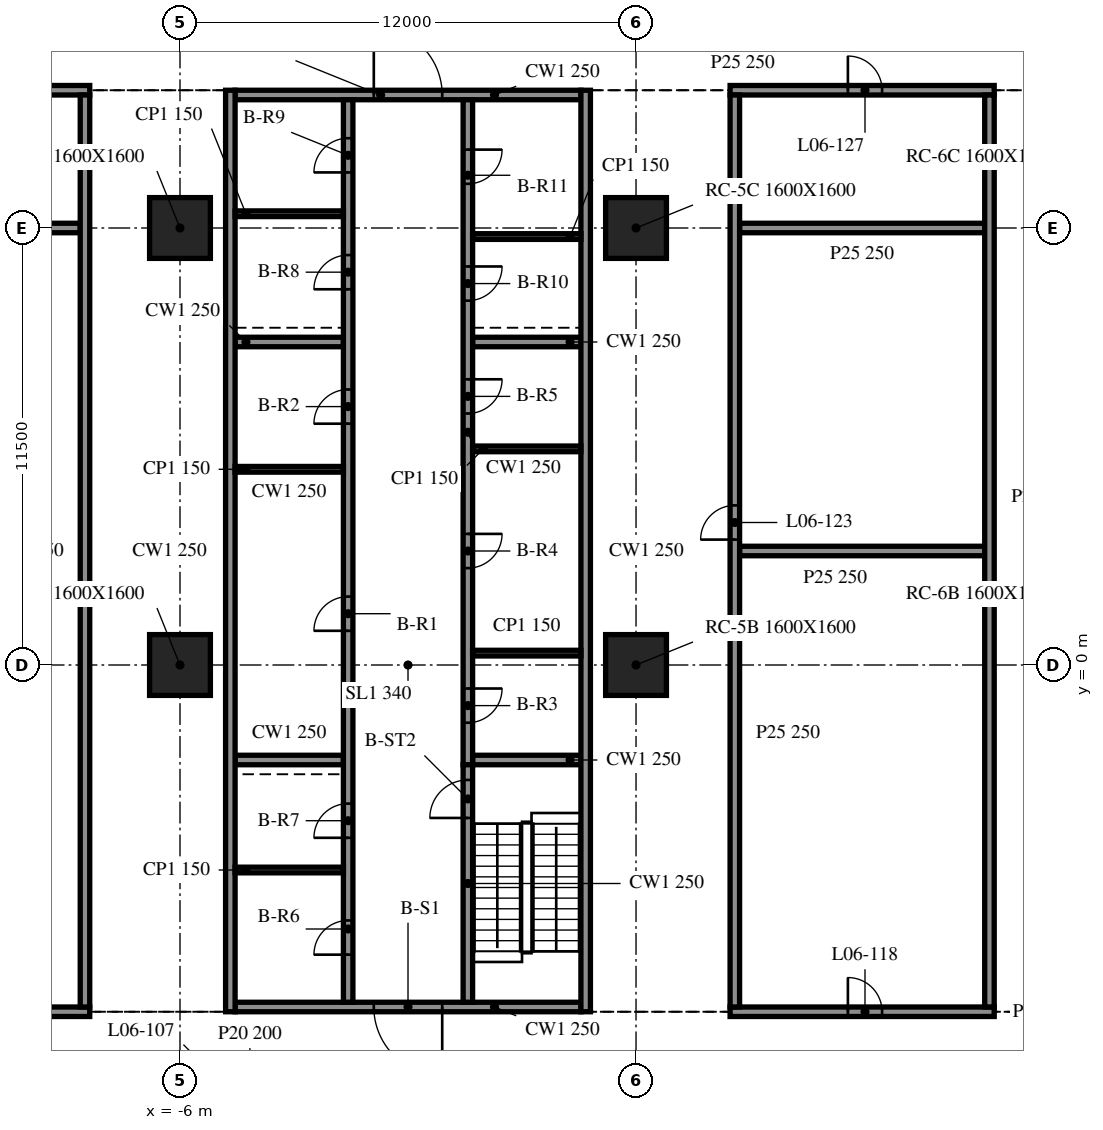
"""IFC4 building model, lengths in metres.
Left out: names, types, materials, properties, quantities, classifications, styles, units other than length and angle.
Written with IfcOpenShell. Run it as: python <this file> out.ifc"""

import sys

from ifc_helpers import new_model, si_unit, direction, frame, frame_2d, origin, origin_2d, place, context, subcontext, project, spatial, rectangle, extrude, element, fill, save


model = new_model("IFC4")
c1 = context("Model", 3, precision=1e-05, world=origin(), true_north=direction((0.0, 1.0)))
c2 = subcontext(c1, "Body", "Model", "MODEL_VIEW")
j1 = project(units=[si_unit("LENGTHUNIT", "METRE"), si_unit("PLANEANGLEUNIT", "RADIAN")], contexts=[c1])
p1 = place(None, origin())
s1 = spatial("IfcSite", under=j1, at=p1, CompositionType="ELEMENT")
p2 = place(p1, origin())
s2 = spatial("IfcBuilding", under=s1, at=p2, CompositionType="ELEMENT")
p3 = place(p2, frame((0.0, 0.0, 28.7)))
s3 = spatial("IfcBuildingStorey", under=s2, at=p3, CompositionType="ELEMENT", Elevation=28.7)
for number, where, z_axis, x_axis in (
    (1, (-6.0, 0.0, -0.34), (0.0, 0.0, 1.0), (1.0, 0.0, 0.0)),
    (2, (-6.0, 11.5, -0.34), (0.0, 0.0, 1.0), (1.0, 0.0, 0.0)),
    (3, (6.0, 0.0, -0.34), (0.0, 0.0, 1.0), (1.0, 0.0, 0.0)),
    (4, (6.0, 11.5, -0.34), (0.0, 0.0, 1.0), (1.0, 0.0, 0.0)),
):
    element("IfcColumn", number, at=place(p3, frame(where, z_axis=z_axis, x_axis=x_axis)), inside=s3, PredefinedType="COLUMN", context=c2, shape_type="SweptSolid", body=[
        extrude(rectangle(XDim=1.6, YDim=1.6, at=origin_2d()), origin(), (0.0, 0.0, 1.0), 4.3),
    ])
for number, where, z_axis, x_axis in (
    (5, (-4.675, 15.125, 0.0), (0.0, 0.0, 1.0), (0.0, -1.0, 0.0)),
    (6, (4.675, -9.125, 0.0), (0.0, 0.0, 1.0), (0.0, 1.0, 0.0)),
):
    element("IfcWall", number, at=place(p3, frame(where, z_axis=z_axis, x_axis=x_axis)), inside=s3, PredefinedType="SOLIDWALL", context=c2, shape_type="SweptSolid", body=[
        extrude(rectangle(XDim=24.25, YDim=0.25, at=frame_2d((12.125, 0.0))), origin(), (0.0, 0.0, 1.0), 3.96),
    ])
p4 = place(p3, frame((4.55, -9.0, 0.0), z_axis=(0.0, 0.0, 1.0), x_axis=(-1.0, 0.0, 0.0)))
e7 = element("IfcWall", 7, at=p4, inside=s3, PredefinedType="SOLIDWALL", context=c2, shape_type="SweptSolid", body=[
    extrude(rectangle(XDim=9.1, YDim=0.25, at=frame_2d((4.55, 0.0))), origin(), (0.0, 0.0, 1.0), 3.96),
])
p5 = place(p4, frame((3.65, 0.0, 0.0)))
e8 = element("IfcOpeningElement", 8, at=p5, cuts=e7, PredefinedType="OPENING", context=c2, shape_type="SweptSolid", body=[
    extrude(rectangle(XDim=1.8, YDim=2.1, at=frame_2d((0.9, 1.05))), frame((0.0, 0.135, 0.0), z_axis=(0.0, -1.0, 0.0), x_axis=(1.0, 0.0, 0.0)), (0.0, 0.0, 1.0), 0.27),
])
p6 = place(p3, frame((-4.55, 15.0, 0.0), z_axis=(0.0, 0.0, 1.0), x_axis=(1.0, 0.0, 0.0)))
e9 = element("IfcWall", 9, at=p6, inside=s3, PredefinedType="SOLIDWALL", context=c2, shape_type="SweptSolid", body=[
    extrude(rectangle(XDim=9.1, YDim=0.25, at=frame_2d((4.55, 0.0))), origin(), (0.0, 0.0, 1.0), 3.96),
])
p7 = place(p6, frame((3.65, 0.0, 0.0)))
e10 = element("IfcOpeningElement", 10, at=p7, cuts=e9, PredefinedType="OPENING", context=c2, shape_type="SweptSolid", body=[
    extrude(rectangle(XDim=1.8, YDim=2.1, at=frame_2d((0.9, 1.05))), frame((0.0, 0.135, 0.0), z_axis=(0.0, -1.0, 0.0), x_axis=(1.0, 0.0, 0.0)), (0.0, 0.0, 1.0), 0.27),
])
p8 = place(p3, frame((-1.575, -8.875, 0.0), z_axis=(0.0, 0.0, 1.0), x_axis=(0.0, 1.0, 0.0)))
e11 = element("IfcWall", 11, at=p8, inside=s3, PredefinedType="SOLIDWALL", context=c2, shape_type="SweptSolid", body=[
    extrude(rectangle(XDim=23.75, YDim=0.25, at=frame_2d((11.875, 0.0))), origin(), (0.0, 0.0, 1.0), 3.96),
])
p9 = place(p8, frame((9.775, 0.0, 0.0)))
e12 = element("IfcOpeningElement", 12, at=p9, cuts=e11, PredefinedType="OPENING", context=c2, shape_type="SweptSolid", body=[
    extrude(rectangle(XDim=0.9, YDim=2.1, at=frame_2d((0.45, 1.05))), frame((0.0, 0.135, 0.0), z_axis=(0.0, -1.0, 0.0), x_axis=(1.0, 0.0, 0.0)), (0.0, 0.0, 1.0), 0.27),
])
p10 = place(p8, frame((15.225, 0.0, 0.0)))
e13 = element("IfcOpeningElement", 13, at=p10, cuts=e11, PredefinedType="OPENING", context=c2, shape_type="SweptSolid", body=[
    extrude(rectangle(XDim=0.9, YDim=2.1, at=frame_2d((0.45, 1.05))), frame((0.0, 0.135, 0.0), z_axis=(0.0, -1.0, 0.0), x_axis=(1.0, 0.0, 0.0)), (0.0, 0.0, 1.0), 0.27),
])
p11 = place(p8, frame((1.252, 0.0, 0.0)))
e14 = element("IfcOpeningElement", 14, at=p11, cuts=e11, PredefinedType="OPENING", context=c2, shape_type="SweptSolid", body=[
    extrude(rectangle(XDim=0.9, YDim=2.1, at=frame_2d((0.45, 1.05))), frame((0.0, 0.135, 0.0), z_axis=(0.0, -1.0, 0.0), x_axis=(1.0, 0.0, 0.0)), (0.0, 0.0, 1.0), 0.27),
])
p12 = place(p8, frame((4.327, 0.0, 0.0)))
e15 = element("IfcOpeningElement", 15, at=p12, cuts=e11, PredefinedType="OPENING", context=c2, shape_type="SweptSolid", body=[
    extrude(rectangle(XDim=0.9, YDim=2.1, at=frame_2d((0.45, 1.05))), frame((0.0, 0.135, 0.0), z_axis=(0.0, -1.0, 0.0), x_axis=(1.0, 0.0, 0.0)), (0.0, 0.0, 1.0), 0.27),
])
p13 = place(p8, frame((18.762, 0.0, 0.0)))
e16 = element("IfcOpeningElement", 16, at=p13, cuts=e11, PredefinedType="OPENING", context=c2, shape_type="SweptSolid", body=[
    extrude(rectangle(XDim=0.9, YDim=2.1, at=frame_2d((0.45, 1.05))), frame((0.0, 0.135, 0.0), z_axis=(0.0, -1.0, 0.0), x_axis=(1.0, 0.0, 0.0)), (0.0, 0.0, 1.0), 0.27),
])
p14 = place(p8, frame((21.837, 0.0, 0.0)))
e17 = element("IfcOpeningElement", 17, at=p14, cuts=e11, PredefinedType="OPENING", context=c2, shape_type="SweptSolid", body=[
    extrude(rectangle(XDim=0.9, YDim=2.1, at=frame_2d((0.45, 1.05))), frame((0.0, 0.135, 0.0), z_axis=(0.0, -1.0, 0.0), x_axis=(1.0, 0.0, 0.0)), (0.0, 0.0, 1.0), 0.27),
])
p15 = place(p3, frame((1.575, -8.875, 0.0), z_axis=(0.0, 0.0, 1.0), x_axis=(0.0, 1.0, 0.0)))
e18 = element("IfcWall", 18, at=p15, inside=s3, PredefinedType="SOLIDWALL", context=c2, shape_type="SweptSolid", body=[
    extrude(rectangle(XDim=6.25, YDim=0.25, at=frame_2d((3.125, 0.0))), origin(), (0.0, 0.0, 1.0), 3.96),
])
p16 = place(p15, frame((4.85, 0.0, 0.0)))
e19 = element("IfcOpeningElement", 19, at=p16, cuts=e18, PredefinedType="OPENING", context=c2, shape_type="SweptSolid", body=[
    extrude(rectangle(XDim=1.0, YDim=2.1, at=frame_2d((0.5, 1.05))), frame((0.0, 0.135, 0.0), z_axis=(0.0, -1.0, 0.0), x_axis=(1.0, 0.0, 0.0)), (0.0, 0.0, 1.0), 0.27),
])
p17 = place(p3, frame((1.575, 14.875, 0.0), z_axis=(0.0, 0.0, 1.0), x_axis=(0.0, -1.0, 0.0)))
e20 = element("IfcWall", 20, at=p17, inside=s3, PredefinedType="SOLIDWALL", context=c2, shape_type="SweptSolid", body=[
    extrude(rectangle(XDim=17.5, YDim=0.25, at=frame_2d((8.75, 0.0))), origin(), (0.0, 0.0, 1.0), 3.96),
])
p18 = place(p17, frame((15.494, 0.0, 0.0)))
e21 = element("IfcOpeningElement", 21, at=p18, cuts=e20, PredefinedType="OPENING", context=c2, shape_type="SweptSolid", body=[
    extrude(rectangle(XDim=0.9, YDim=2.1, at=frame_2d((0.45, 1.05))), frame((0.0, 0.135, 0.0), z_axis=(0.0, -1.0, 0.0), x_axis=(1.0, 0.0, 0.0)), (0.0, 0.0, 1.0), 0.27),
])
p19 = place(p17, frame((11.425, 0.0, 0.0)))
e22 = element("IfcOpeningElement", 22, at=p19, cuts=e20, PredefinedType="OPENING", context=c2, shape_type="SweptSolid", body=[
    extrude(rectangle(XDim=0.9, YDim=2.1, at=frame_2d((0.45, 1.05))), frame((0.0, 0.135, 0.0), z_axis=(0.0, -1.0, 0.0), x_axis=(1.0, 0.0, 0.0)), (0.0, 0.0, 1.0), 0.27),
])
p20 = place(p17, frame((7.356, 0.0, 0.0)))
e23 = element("IfcOpeningElement", 23, at=p20, cuts=e20, PredefinedType="OPENING", context=c2, shape_type="SweptSolid", body=[
    extrude(rectangle(XDim=0.9, YDim=2.1, at=frame_2d((0.45, 1.05))), frame((0.0, 0.135, 0.0), z_axis=(0.0, -1.0, 0.0), x_axis=(1.0, 0.0, 0.0)), (0.0, 0.0, 1.0), 0.27),
])
p21 = place(p17, frame((4.387, 0.0, 0.0)))
e24 = element("IfcOpeningElement", 24, at=p21, cuts=e20, PredefinedType="OPENING", context=c2, shape_type="SweptSolid", body=[
    extrude(rectangle(XDim=0.9, YDim=2.1, at=frame_2d((0.45, 1.05))), frame((0.0, 0.135, 0.0), z_axis=(0.0, -1.0, 0.0), x_axis=(1.0, 0.0, 0.0)), (0.0, 0.0, 1.0), 0.27),
])
p22 = place(p17, frame((1.312, 0.0, 0.0)))
e25 = element("IfcOpeningElement", 25, at=p22, cuts=e20, PredefinedType="OPENING", context=c2, shape_type="SweptSolid", body=[
    extrude(rectangle(XDim=0.9, YDim=2.1, at=frame_2d((0.45, 1.05))), frame((0.0, 0.135, 0.0), z_axis=(0.0, -1.0, 0.0), x_axis=(1.0, 0.0, 0.0)), (0.0, 0.0, 1.0), 0.27),
])
for number, where, z_axis, x_axis in (
    (26, (-4.55, -2.5, 0.0), (0.0, 0.0, 1.0), (1.0, 0.0, 0.0)),
    (27, (-4.55, 8.5, 0.0), (0.0, 0.0, 1.0), (1.0, 0.0, 0.0)),
    (28, (1.7, -2.5, 0.0), (0.0, 0.0, 1.0), (1.0, 0.0, 0.0)),
    (29, (1.7, 8.5, 0.0), (0.0, 0.0, 1.0), (1.0, 0.0, 0.0)),
):
    element("IfcWall", number, at=place(p3, frame(where, z_axis=z_axis, x_axis=x_axis)), inside=s3, PredefinedType="SOLIDWALL", context=c2, shape_type="SweptSolid", body=[
        extrude(rectangle(XDim=2.85, YDim=0.25, at=frame_2d((1.425, 0.0))), origin(), (0.0, 0.0, 1.0), 3.96),
    ])
for number, where, z_axis, x_axis in (
    (30, (-4.55, 5.15, 0.0), (0.0, 0.0, 1.0), (1.0, 0.0, 0.0)),
    (31, (1.7, 0.312, 0.0), (0.0, 0.0, 1.0), (1.0, 0.0, 0.0)),
    (32, (1.7, 5.688, 0.0), (0.0, 0.0, 1.0), (1.0, 0.0, 0.0)),
    (33, (-4.55, -5.395, 0.0), (0.0, 0.0, 1.0), (1.0, 0.0, 0.0)),
    (34, (-4.55, 11.875, 0.0), (0.0, 0.0, 1.0), (1.0, 0.0, 0.0)),
    (35, (1.7, 11.275, 0.0), (0.0, 0.0, 1.0), (1.0, 0.0, 0.0)),
):
    element("IfcWall", number, at=place(p3, frame(where, z_axis=z_axis, x_axis=x_axis)), inside=s3, PredefinedType="PARTITIONING", context=c2, shape_type="SweptSolid", body=[
        extrude(rectangle(XDim=2.85, YDim=0.15, at=frame_2d((1.425, 0.0))), origin(), (0.0, 0.0, 1.0), 3.96),
    ])
p23 = place(p3, frame((-15.725, -9.125, 0.0), z_axis=(0.0, 0.0, 1.0), x_axis=(1.0, 0.0, 0.0)))
e36 = element("IfcWall", 36, at=p23, inside=s3, PredefinedType="PARTITIONING", context=c2, shape_type="SweptSolid", body=[
    extrude(rectangle(XDim=7.35, YDim=0.25, at=frame_2d((3.675, 0.0))), origin(), (0.0, 0.0, 1.0), 3.96),
])
p24 = place(p3, frame((8.475, -9.125, 0.0), z_axis=(0.0, 0.0, 1.0), x_axis=(1.0, 0.0, 0.0)))
e37 = element("IfcWall", 37, at=p24, inside=s3, PredefinedType="PARTITIONING", context=c2, shape_type="SweptSolid", body=[
    extrude(rectangle(XDim=6.95, YDim=0.25, at=frame_2d((3.475, 0.0))), origin(), (0.0, 0.0, 1.0), 3.96),
])
p25 = place(p24, frame((3.1, 0.0, 0.0)))
e38 = element("IfcOpeningElement", 38, at=p25, cuts=e37, PredefinedType="OPENING", context=c2, shape_type="SweptSolid", body=[
    extrude(rectangle(XDim=0.9, YDim=2.1, at=frame_2d((0.45, 1.05))), frame((0.0, 0.135, 0.0), z_axis=(0.0, -1.0, 0.0), x_axis=(1.0, 0.0, 0.0)), (0.0, 0.0, 1.0), 0.27),
])
p26 = place(p3, frame((8.725, 3.0, 0.0), z_axis=(0.0, 0.0, 1.0), x_axis=(1.0, 0.0, 0.0)))
e39 = element("IfcWall", 39, at=p26, inside=s3, PredefinedType="PARTITIONING", context=c2, shape_type="SweptSolid", body=[
    extrude(rectangle(XDim=6.45, YDim=0.25, at=frame_2d((3.225, 0.0))), origin(), (0.0, 0.0, 1.0), 3.96),
])
p27 = place(p3, frame((-15.475, 11.5, 0.0), z_axis=(0.0, 0.0, 1.0), x_axis=(1.0, 0.0, 0.0)))
e40 = element("IfcWall", 40, at=p27, inside=s3, PredefinedType="PARTITIONING", context=c2, shape_type="SweptSolid", body=[
    extrude(rectangle(XDim=6.85, YDim=0.25, at=frame_2d((3.425, 0.0))), origin(), (0.0, 0.0, 1.0), 3.96),
])
p28 = place(p3, frame((8.725, 11.5, 0.0), z_axis=(0.0, 0.0, 1.0), x_axis=(1.0, 0.0, 0.0)))
e41 = element("IfcWall", 41, at=p28, inside=s3, PredefinedType="PARTITIONING", context=c2, shape_type="SweptSolid", body=[
    extrude(rectangle(XDim=6.45, YDim=0.25, at=frame_2d((3.225, 0.0))), origin(), (0.0, 0.0, 1.0), 3.96),
])
p29 = place(p3, frame((-15.725, 15.125, 0.0), z_axis=(0.0, 0.0, 1.0), x_axis=(1.0, 0.0, 0.0)))
e42 = element("IfcWall", 42, at=p29, inside=s3, PredefinedType="PARTITIONING", context=c2, shape_type="SweptSolid", body=[
    extrude(rectangle(XDim=7.35, YDim=0.25, at=frame_2d((3.675, 0.0))), origin(), (0.0, 0.0, 1.0), 3.96),
])
p30 = place(p29, frame((3.3, 0.0, 0.0)))
e43 = element("IfcOpeningElement", 43, at=p30, cuts=e42, PredefinedType="OPENING", context=c2, shape_type="SweptSolid", body=[
    extrude(rectangle(XDim=0.9, YDim=2.1, at=frame_2d((0.45, 1.05))), frame((0.0, 0.135, 0.0), z_axis=(0.0, -1.0, 0.0), x_axis=(1.0, 0.0, 0.0)), (0.0, 0.0, 1.0), 0.27),
])
p31 = place(p3, frame((8.475, 15.125, 0.0), z_axis=(0.0, 0.0, 1.0), x_axis=(1.0, 0.0, 0.0)))
e44 = element("IfcWall", 44, at=p31, inside=s3, PredefinedType="PARTITIONING", context=c2, shape_type="SweptSolid", body=[
    extrude(rectangle(XDim=6.95, YDim=0.25, at=frame_2d((3.475, 0.0))), origin(), (0.0, 0.0, 1.0), 3.96),
])
p32 = place(p31, frame((3.1, 0.0, 0.0)))
e45 = element("IfcOpeningElement", 45, at=p32, cuts=e44, PredefinedType="OPENING", context=c2, shape_type="SweptSolid", body=[
    extrude(rectangle(XDim=0.9, YDim=2.1, at=frame_2d((0.45, 1.05))), frame((0.0, 0.135, 0.0), z_axis=(0.0, -1.0, 0.0), x_axis=(1.0, 0.0, 0.0)), (0.0, 0.0, 1.0), 0.27),
])
p33 = place(p3, frame((-8.5, -9.0, 0.0), z_axis=(0.0, 0.0, 1.0), x_axis=(0.0, 1.0, 0.0)))
e46 = element("IfcWall", 46, at=p33, inside=s3, PredefinedType="PARTITIONING", context=c2, shape_type="SweptSolid", body=[
    extrude(rectangle(XDim=24.0, YDim=0.25, at=frame_2d((12.0, 0.0))), origin(), (0.0, 0.0, 1.0), 3.96),
])
p34 = place(p3, frame((8.6, -9.0, 0.0), z_axis=(0.0, 0.0, 1.0), x_axis=(0.0, 1.0, 0.0)))
e47 = element("IfcWall", 47, at=p34, inside=s3, PredefinedType="PARTITIONING", context=c2, shape_type="SweptSolid", body=[
    extrude(rectangle(XDim=24.0, YDim=0.25, at=frame_2d((12.0, 0.0))), origin(), (0.0, 0.0, 1.0), 3.96),
])
p35 = place(p34, frame((12.3, 0.0, 0.0)))
e48 = element("IfcOpeningElement", 48, at=p35, cuts=e47, PredefinedType="OPENING", context=c2, shape_type="SweptSolid", body=[
    extrude(rectangle(XDim=0.9, YDim=2.1, at=frame_2d((0.45, 1.05))), frame((0.0, 0.135, 0.0), z_axis=(0.0, -1.0, 0.0), x_axis=(1.0, 0.0, 0.0)), (0.0, 0.0, 1.0), 0.27),
])
p36 = place(p3, frame((15.3, -9.0, 0.0), z_axis=(0.0, 0.0, 1.0), x_axis=(0.0, 1.0, 0.0)))
e49 = element("IfcWall", 49, at=p36, inside=s3, PredefinedType="PARTITIONING", context=c2, shape_type="SweptSolid", body=[
    extrude(rectangle(XDim=24.0, YDim=0.25, at=frame_2d((12.0, 0.0))), origin(), (0.0, 0.0, 1.0), 3.96),
])
p37 = place(p5, origin())
e50 = element("IfcDoor", 50, at=p37, inside=s3, OperationType="DOUBLE_DOOR_SINGLE_SWING", PredefinedType="DOOR", context=c2, shape_type="SweptSolid", body=[
    extrude(rectangle(XDim=1.8, YDim=2.1, at=frame_2d((0.9, 1.05))), frame((0.0, 0.025, 0.0), z_axis=(0.0, -1.0, 0.0), x_axis=(1.0, 0.0, 0.0)), (0.0, 0.0, 1.0), 0.05),
])
fill(e8, e50)
p38 = place(p7, origin())
e51 = element("IfcDoor", 51, at=p38, inside=s3, OperationType="DOUBLE_DOOR_SINGLE_SWING", PredefinedType="DOOR", context=c2, shape_type="SweptSolid", body=[
    extrude(rectangle(XDim=1.8, YDim=2.1, at=frame_2d((0.9, 1.05))), frame((0.0, 0.025, 0.0), z_axis=(0.0, -1.0, 0.0), x_axis=(1.0, 0.0, 0.0)), (0.0, 0.0, 1.0), 0.05),
])
fill(e10, e51)
p39 = place(p9, origin())
e52 = element("IfcDoor", 52, at=p39, inside=s3, OperationType="SINGLE_SWING_LEFT", PredefinedType="DOOR", context=c2, shape_type="SweptSolid", body=[
    extrude(rectangle(XDim=0.9, YDim=2.1, at=frame_2d((0.45, 1.05))), frame((0.0, 0.025, 0.0), z_axis=(0.0, -1.0, 0.0), x_axis=(1.0, 0.0, 0.0)), (0.0, 0.0, 1.0), 0.05),
])
fill(e12, e52)
p40 = place(p10, origin())
e53 = element("IfcDoor", 53, at=p40, inside=s3, OperationType="SINGLE_SWING_RIGHT", PredefinedType="DOOR", context=c2, shape_type="SweptSolid", body=[
    extrude(rectangle(XDim=0.9, YDim=2.1, at=frame_2d((0.45, 1.05))), frame((0.0, 0.025, 0.0), z_axis=(0.0, -1.0, 0.0), x_axis=(1.0, 0.0, 0.0)), (0.0, 0.0, 1.0), 0.05),
])
fill(e13, e53)
p41 = place(p18, origin())
e54 = element("IfcDoor", 54, at=p41, inside=s3, OperationType="SINGLE_SWING_LEFT", PredefinedType="DOOR", context=c2, shape_type="SweptSolid", body=[
    extrude(rectangle(XDim=0.9, YDim=2.1, at=frame_2d((0.45, 1.05))), frame((0.0, 0.025, 0.0), z_axis=(0.0, -1.0, 0.0), x_axis=(1.0, 0.0, 0.0)), (0.0, 0.0, 1.0), 0.05),
])
fill(e21, e54)
p42 = place(p19, origin())
e55 = element("IfcDoor", 55, at=p42, inside=s3, OperationType="SINGLE_SWING_RIGHT", PredefinedType="DOOR", context=c2, shape_type="SweptSolid", body=[
    extrude(rectangle(XDim=0.9, YDim=2.1, at=frame_2d((0.45, 1.05))), frame((0.0, 0.025, 0.0), z_axis=(0.0, -1.0, 0.0), x_axis=(1.0, 0.0, 0.0)), (0.0, 0.0, 1.0), 0.05),
])
fill(e22, e55)
p43 = place(p20, origin())
e56 = element("IfcDoor", 56, at=p43, inside=s3, OperationType="SINGLE_SWING_LEFT", PredefinedType="DOOR", context=c2, shape_type="SweptSolid", body=[
    extrude(rectangle(XDim=0.9, YDim=2.1, at=frame_2d((0.45, 1.05))), frame((0.0, 0.025, 0.0), z_axis=(0.0, -1.0, 0.0), x_axis=(1.0, 0.0, 0.0)), (0.0, 0.0, 1.0), 0.05),
])
fill(e23, e56)
p44 = place(p11, origin())
e57 = element("IfcDoor", 57, at=p44, inside=s3, OperationType="SINGLE_SWING_RIGHT", PredefinedType="DOOR", context=c2, shape_type="SweptSolid", body=[
    extrude(rectangle(XDim=0.9, YDim=2.1, at=frame_2d((0.45, 1.05))), frame((0.0, 0.025, 0.0), z_axis=(0.0, -1.0, 0.0), x_axis=(1.0, 0.0, 0.0)), (0.0, 0.0, 1.0), 0.05),
])
fill(e14, e57)
p45 = place(p12, origin())
e58 = element("IfcDoor", 58, at=p45, inside=s3, OperationType="SINGLE_SWING_LEFT", PredefinedType="DOOR", context=c2, shape_type="SweptSolid", body=[
    extrude(rectangle(XDim=0.9, YDim=2.1, at=frame_2d((0.45, 1.05))), frame((0.0, 0.025, 0.0), z_axis=(0.0, -1.0, 0.0), x_axis=(1.0, 0.0, 0.0)), (0.0, 0.0, 1.0), 0.05),
])
fill(e15, e58)
p46 = place(p13, origin())
e59 = element("IfcDoor", 59, at=p46, inside=s3, OperationType="SINGLE_SWING_RIGHT", PredefinedType="DOOR", context=c2, shape_type="SweptSolid", body=[
    extrude(rectangle(XDim=0.9, YDim=2.1, at=frame_2d((0.45, 1.05))), frame((0.0, 0.025, 0.0), z_axis=(0.0, -1.0, 0.0), x_axis=(1.0, 0.0, 0.0)), (0.0, 0.0, 1.0), 0.05),
])
fill(e16, e59)
p47 = place(p14, origin())
e60 = element("IfcDoor", 60, at=p47, inside=s3, OperationType="SINGLE_SWING_LEFT", PredefinedType="DOOR", context=c2, shape_type="SweptSolid", body=[
    extrude(rectangle(XDim=0.9, YDim=2.1, at=frame_2d((0.45, 1.05))), frame((0.0, 0.025, 0.0), z_axis=(0.0, -1.0, 0.0), x_axis=(1.0, 0.0, 0.0)), (0.0, 0.0, 1.0), 0.05),
])
fill(e17, e60)
p48 = place(p21, origin())
e61 = element("IfcDoor", 61, at=p48, inside=s3, OperationType="SINGLE_SWING_RIGHT", PredefinedType="DOOR", context=c2, shape_type="SweptSolid", body=[
    extrude(rectangle(XDim=0.9, YDim=2.1, at=frame_2d((0.45, 1.05))), frame((0.0, 0.025, 0.0), z_axis=(0.0, -1.0, 0.0), x_axis=(1.0, 0.0, 0.0)), (0.0, 0.0, 1.0), 0.05),
])
fill(e24, e61)
p49 = place(p22, origin())
e62 = element("IfcDoor", 62, at=p49, inside=s3, OperationType="SINGLE_SWING_LEFT", PredefinedType="DOOR", context=c2, shape_type="SweptSolid", body=[
    extrude(rectangle(XDim=0.9, YDim=2.1, at=frame_2d((0.45, 1.05))), frame((0.0, 0.025, 0.0), z_axis=(0.0, -1.0, 0.0), x_axis=(1.0, 0.0, 0.0)), (0.0, 0.0, 1.0), 0.05),
])
fill(e25, e62)
p50 = place(p16, origin())
e63 = element("IfcDoor", 63, at=p50, inside=s3, OperationType="SINGLE_SWING_RIGHT", PredefinedType="DOOR", context=c2, shape_type="SweptSolid", body=[
    extrude(rectangle(XDim=1.0, YDim=2.1, at=frame_2d((0.5, 1.05))), frame((0.0, 0.025, 0.0), z_axis=(0.0, -1.0, 0.0), x_axis=(1.0, 0.0, 0.0)), (0.0, 0.0, 1.0), 0.05),
])
fill(e19, e63)
p51 = place(p25, origin())
e64 = element("IfcDoor", 64, at=p51, inside=s3, OperationType="SINGLE_SWING_RIGHT", PredefinedType="DOOR", context=c2, shape_type="SweptSolid", body=[
    extrude(rectangle(XDim=0.9, YDim=2.1, at=frame_2d((0.45, 1.05))), frame((0.0, 0.025, 0.0), z_axis=(0.0, -1.0, 0.0), x_axis=(1.0, 0.0, 0.0)), (0.0, 0.0, 1.0), 0.05),
])
fill(e38, e64)
p52 = place(p35, origin())
e65 = element("IfcDoor", 65, at=p52, inside=s3, OperationType="SINGLE_SWING_LEFT", PredefinedType="DOOR", context=c2, shape_type="SweptSolid", body=[
    extrude(rectangle(XDim=0.9, YDim=2.1, at=frame_2d((0.45, 1.05))), frame((0.0, 0.025, 0.0), z_axis=(0.0, -1.0, 0.0), x_axis=(1.0, 0.0, 0.0)), (0.0, 0.0, 1.0), 0.05),
])
fill(e48, e65)
p53 = place(p32, origin())
e66 = element("IfcDoor", 66, at=p53, inside=s3, OperationType="SINGLE_SWING_LEFT", PredefinedType="DOOR", context=c2, shape_type="SweptSolid", body=[
    extrude(rectangle(XDim=0.9, YDim=2.1, at=frame_2d((0.45, 1.05))), frame((0.0, 0.025, 0.0), z_axis=(0.0, -1.0, 0.0), x_axis=(1.0, 0.0, 0.0)), (0.0, 0.0, 1.0), 0.05),
])
fill(e45, e66)
save(model, sys.argv[1])
